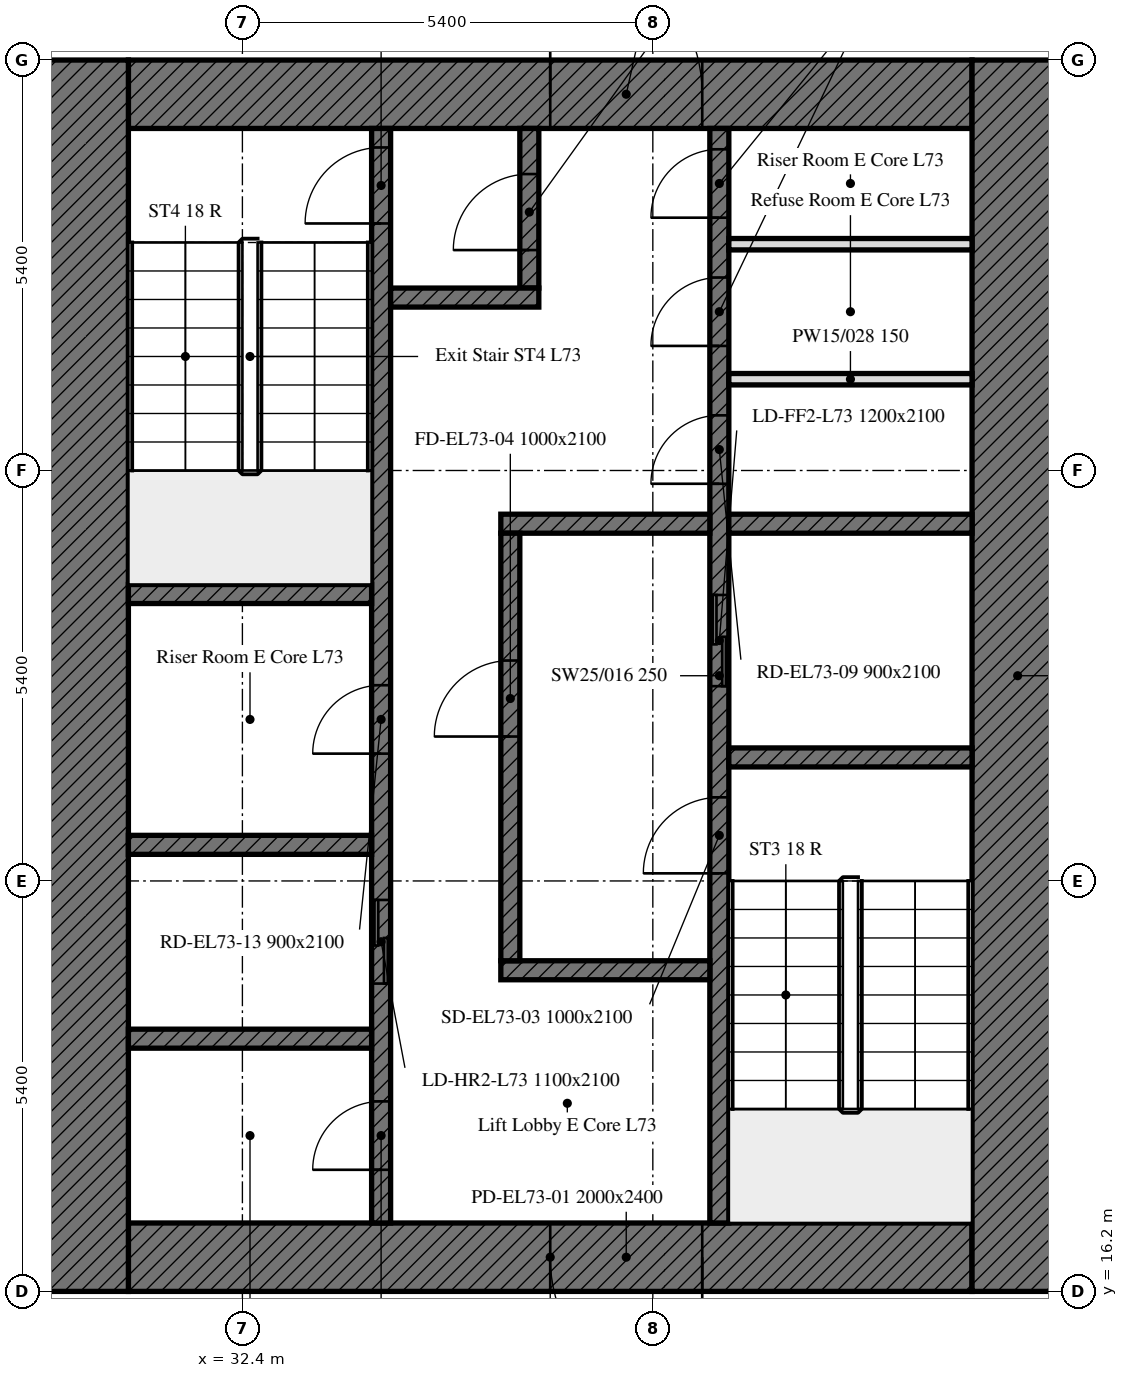
"""IFC4 building model, lengths in metres.
Left out: names, types, materials, properties, quantities, classifications, styles, units other than length and angle.
Written with IfcOpenShell. Run it as: python <this file> out.ifc"""

import sys

from ifc_helpers import new_model, si_unit, direction, frame, frame_2d, origin, place, context, subcontext, project, spatial, rectangle, extrude, element, fill, save


model = new_model("IFC4")
c1 = context("Model", 3, precision=1e-05, world=origin(), true_north=direction((0.0, 1.0)))
c2 = subcontext(c1, "Body", "Model", "MODEL_VIEW")
j1 = project(units=[si_unit("LENGTHUNIT", "METRE"), si_unit("PLANEANGLEUNIT", "RADIAN")], contexts=[c1])
p1 = place(None, origin())
s1 = spatial("IfcSite", under=j1, at=p1, CompositionType="ELEMENT")
p2 = place(p1, origin())
s2 = spatial("IfcBuilding", under=s1, at=p2, CompositionType="ELEMENT")
p3 = place(p2, frame((0.0, 0.0, 295.0)))
s3 = spatial("IfcBuildingStorey", under=s2, at=p3, CompositionType="ELEMENT", Elevation=295.0)
p4 = place(p3, frame((42.0, 16.65, 0.0), z_axis=(0.0, 0.0, 1.0), x_axis=(-1.0, 0.0, 0.0)))
e1 = element("IfcWall", 1, at=p4, inside=s3, PredefinedType="SOLIDWALL", context=c2, shape_type="SweptSolid", body=[
    extrude(rectangle(XDim=11.1, YDim=0.9, at=frame_2d((5.55, 0.0))), origin(), (0.0, 0.0, 1.0), 3.0),
])
p5 = place(p4, frame((3.55, 0.0, 0.0)))
e2 = element("IfcOpeningElement", 2, at=p5, cuts=e1, PredefinedType="OPENING", context=c2, shape_type="SweptSolid", body=[
    extrude(rectangle(XDim=2.0, YDim=2.4, at=frame_2d((1.0, 1.2))), frame((0.0, 0.45, 0.0), z_axis=(0.0, -1.0, 0.0), x_axis=(1.0, 0.0, 0.0)), (0.0, 0.0, 1.0), 0.9),
])
p6 = place(p3, frame((30.9, 31.95, 0.0), z_axis=(0.0, 0.0, 1.0), x_axis=(1.0, 0.0, 0.0)))
e3 = element("IfcWall", 3, at=p6, inside=s3, PredefinedType="SOLIDWALL", context=c2, shape_type="SweptSolid", body=[
    extrude(rectangle(XDim=11.1, YDim=0.9, at=frame_2d((5.55, 0.0))), origin(), (0.0, 0.0, 1.0), 3.0),
])
p7 = place(p6, frame((5.55, 0.0, 0.0)))
e4 = element("IfcOpeningElement", 4, at=p7, cuts=e3, PredefinedType="OPENING", context=c2, shape_type="SweptSolid", body=[
    extrude(rectangle(XDim=2.0, YDim=2.4, at=frame_2d((1.0, 1.2))), frame((0.0, 0.45, 0.0), z_axis=(0.0, -1.0, 0.0), x_axis=(1.0, 0.0, 0.0)), (0.0, 0.0, 1.0), 0.9),
])
for number, where, z_axis, x_axis in (
    (5, (42.6, 32.4, 0.0), (0.0, 0.0, 1.0), (0.0, -1.0, 0.0)),
    (6, (30.3, 16.2, 0.0), (0.0, 0.0, 1.0), (0.0, 1.0, 0.0)),
):
    element("IfcWall", number, at=place(p3, frame(where, z_axis=z_axis, x_axis=x_axis)), inside=s3, PredefinedType="SOLIDWALL", context=c2, shape_type="SweptSolid", body=[
        extrude(rectangle(XDim=16.2, YDim=1.2, at=frame_2d((8.1, 0.0))), origin(), (0.0, 0.0, 1.0), 3.0),
    ])
p8 = place(p3, frame((38.675, 17.1, 0.0), z_axis=(0.0, 0.0, 1.0), x_axis=(0.0, 1.0, 0.0)))
e7 = element("IfcWall", 7, at=p8, inside=s3, PredefinedType="SOLIDWALL", context=c2, shape_type="SweptSolid", body=[
    extrude(rectangle(XDim=14.4, YDim=0.25, at=frame_2d((7.2, 0.0))), origin(), (0.0, 0.0, 1.0), 3.0),
])
p9 = place(p8, frame((4.6, 0.0, 0.0)))
e8 = element("IfcOpeningElement", 8, at=p9, cuts=e7, PredefinedType="OPENING", context=c2, shape_type="SweptSolid", body=[
    extrude(rectangle(XDim=1.0, YDim=2.1, at=frame_2d((0.5, 1.05))), frame((0.0, 0.125, 0.0), z_axis=(0.0, -1.0, 0.0), x_axis=(1.0, 0.0, 0.0)), (0.0, 0.0, 1.0), 0.25),
])
p10 = place(p8, frame((7.062, 0.0, 0.0)))
e9 = element("IfcOpeningElement", 9, at=p10, cuts=e7, PredefinedType="OPENING", context=c2, shape_type="SweptSolid", body=[
    extrude(rectangle(XDim=1.2, YDim=2.1, at=frame_2d((0.6, 1.05))), frame((0.0, 0.125, 0.0), z_axis=(0.0, -1.0, 0.0), x_axis=(1.0, 0.0, 0.0)), (0.0, 0.0, 1.0), 0.25),
])
p11 = place(p8, frame((9.726, 0.0, 0.0)))
e10 = element("IfcOpeningElement", 10, at=p11, cuts=e7, PredefinedType="OPENING", context=c2, shape_type="SweptSolid", body=[
    extrude(rectangle(XDim=0.9, YDim=2.1, at=frame_2d((0.45, 1.05))), frame((0.0, 0.125, 0.0), z_axis=(0.0, -1.0, 0.0), x_axis=(1.0, 0.0, 0.0)), (0.0, 0.0, 1.0), 0.25),
])
p12 = place(p8, frame((11.539, 0.0, 0.0)))
e11 = element("IfcOpeningElement", 11, at=p12, cuts=e7, PredefinedType="OPENING", context=c2, shape_type="SweptSolid", body=[
    extrude(rectangle(XDim=0.9, YDim=2.1, at=frame_2d((0.45, 1.05))), frame((0.0, 0.125, 0.0), z_axis=(0.0, -1.0, 0.0), x_axis=(1.0, 0.0, 0.0)), (0.0, 0.0, 1.0), 0.25),
])
p13 = place(p8, frame((13.226, 0.0, 0.0)))
e12 = element("IfcOpeningElement", 12, at=p13, cuts=e7, PredefinedType="OPENING", context=c2, shape_type="SweptSolid", body=[
    extrude(rectangle(XDim=0.9, YDim=2.1, at=frame_2d((0.45, 1.05))), frame((0.0, 0.125, 0.0), z_axis=(0.0, -1.0, 0.0), x_axis=(1.0, 0.0, 0.0)), (0.0, 0.0, 1.0), 0.25),
])
p14 = place(p3, frame((34.225, 17.1, 0.0), z_axis=(0.0, 0.0, 1.0), x_axis=(0.0, 1.0, 0.0)))
e13 = element("IfcWall", 13, at=p14, inside=s3, PredefinedType="SOLIDWALL", context=c2, shape_type="SweptSolid", body=[
    extrude(rectangle(XDim=14.4, YDim=0.25, at=frame_2d((7.2, 0.0))), origin(), (0.0, 0.0, 1.0), 3.0),
])
p15 = place(p14, frame((13.15, 0.0, 0.0)))
e14 = element("IfcOpeningElement", 14, at=p15, cuts=e13, PredefinedType="OPENING", context=c2, shape_type="SweptSolid", body=[
    extrude(rectangle(XDim=1.0, YDim=2.1, at=frame_2d((0.5, 1.05))), frame((0.0, 0.125, 0.0), z_axis=(0.0, -1.0, 0.0), x_axis=(1.0, 0.0, 0.0)), (0.0, 0.0, 1.0), 0.25),
])
p16 = place(p14, frame((3.15, 0.0, 0.0)))
e15 = element("IfcOpeningElement", 15, at=p16, cuts=e13, PredefinedType="OPENING", context=c2, shape_type="SweptSolid", body=[
    extrude(rectangle(XDim=1.1, YDim=2.1, at=frame_2d((0.55, 1.05))), frame((0.0, 0.125, 0.0), z_axis=(0.0, -1.0, 0.0), x_axis=(1.0, 0.0, 0.0)), (0.0, 0.0, 1.0), 0.25),
])
p17 = place(p14, frame((0.7, 0.0, 0.0)))
e16 = element("IfcOpeningElement", 16, at=p17, cuts=e13, PredefinedType="OPENING", context=c2, shape_type="SweptSolid", body=[
    extrude(rectangle(XDim=0.9, YDim=2.1, at=frame_2d((0.45, 1.05))), frame((0.0, 0.125, 0.0), z_axis=(0.0, -1.0, 0.0), x_axis=(1.0, 0.0, 0.0)), (0.0, 0.0, 1.0), 0.25),
])
p18 = place(p14, frame((6.175, 0.0, 0.0)))
e17 = element("IfcOpeningElement", 17, at=p18, cuts=e13, PredefinedType="OPENING", context=c2, shape_type="SweptSolid", body=[
    extrude(rectangle(XDim=0.9, YDim=2.1, at=frame_2d((0.45, 1.05))), frame((0.0, 0.125, 0.0), z_axis=(0.0, -1.0, 0.0), x_axis=(1.0, 0.0, 0.0)), (0.0, 0.0, 1.0), 0.25),
])
p19 = place(p3, frame((38.8, 23.225, 0.0), z_axis=(0.0, 0.0, 1.0), x_axis=(1.0, 0.0, 0.0)))
e18 = element("IfcWall", 18, at=p19, inside=s3, PredefinedType="SOLIDWALL", context=c2, shape_type="SweptSolid", body=[
    extrude(rectangle(XDim=3.2, YDim=0.25, at=frame_2d((1.6, 0.0))), origin(), (0.0, 0.0, 1.0), 3.0),
])
for number, where, z_axis, x_axis in (
    (19, (30.9, 25.375, 0.0), (0.0, 0.0, 1.0), (1.0, 0.0, 0.0)),
    (20, (30.9, 22.075, 0.0), (0.0, 0.0, 1.0), (1.0, 0.0, 0.0)),
):
    element("IfcWall", number, at=place(p3, frame(where, z_axis=z_axis, x_axis=x_axis)), inside=s3, PredefinedType="SOLIDWALL", context=c2, shape_type="SweptSolid", body=[
        extrude(rectangle(XDim=3.2, YDim=0.25, at=frame_2d((1.6, 0.0))), origin(), (0.0, 0.0, 1.0), 3.0),
    ])
p20 = place(p3, frame((38.8, 26.3, 0.0), z_axis=(0.0, 0.0, 1.0), x_axis=(1.0, 0.0, 0.0)))
e21 = element("IfcWall", 21, at=p20, inside=s3, PredefinedType="SOLIDWALL", context=c2, shape_type="SweptSolid", body=[
    extrude(rectangle(XDim=3.2, YDim=0.25, at=frame_2d((1.6, 0.0))), origin(), (0.0, 0.0, 1.0), 3.0),
])
for number, where, z_axis, x_axis in (
    (22, (35.8, 26.3, 0.0), (0.0, 0.0, 1.0), (1.0, 0.0, 0.0)),
    (23, (35.8, 20.425, 0.0), (0.0, 0.0, 1.0), (1.0, 0.0, 0.0)),
):
    element("IfcWall", number, at=place(p3, frame(where, z_axis=z_axis, x_axis=x_axis)), inside=s3, PredefinedType="SOLIDWALL", context=c2, shape_type="SweptSolid", body=[
        extrude(rectangle(XDim=2.75, YDim=0.25, at=frame_2d((1.375, 0.0))), origin(), (0.0, 0.0, 1.0), 3.0),
    ])
p21 = place(p3, frame((36.175, 29.4, 0.0), z_axis=(0.0, 0.0, 1.0), x_axis=(0.0, 1.0, 0.0)))
e24 = element("IfcWall", 24, at=p21, inside=s3, PredefinedType="SOLIDWALL", context=c2, shape_type="SweptSolid", body=[
    extrude(rectangle(XDim=2.1, YDim=0.25, at=frame_2d((1.05, 0.0))), origin(), (0.0, 0.0, 1.0), 3.0),
])
p22 = place(p21, frame((0.5, 0.0, 0.0)))
e25 = element("IfcOpeningElement", 25, at=p22, cuts=e24, PredefinedType="OPENING", context=c2, shape_type="SweptSolid", body=[
    extrude(rectangle(XDim=1.0, YDim=2.1, at=frame_2d((0.5, 1.05))), frame((0.0, 0.125, 0.0), z_axis=(0.0, -1.0, 0.0), x_axis=(1.0, 0.0, 0.0)), (0.0, 0.0, 1.0), 0.25),
])
p23 = place(p3, frame((34.35, 29.275, 0.0), z_axis=(0.0, 0.0, 1.0), x_axis=(1.0, 0.0, 0.0)))
e26 = element("IfcWall", 26, at=p23, inside=s3, PredefinedType="SOLIDWALL", context=c2, shape_type="SweptSolid", body=[
    extrude(rectangle(XDim=1.95, YDim=0.25, at=frame_2d((0.975, 0.0))), origin(), (0.0, 0.0, 1.0), 3.0),
])
p24 = place(p3, frame((35.925, 20.55, 0.0), z_axis=(0.0, 0.0, 1.0), x_axis=(0.0, 1.0, 0.0)))
e27 = element("IfcWall", 27, at=p24, inside=s3, PredefinedType="SOLIDWALL", context=c2, shape_type="SweptSolid", body=[
    extrude(rectangle(XDim=5.625, YDim=0.25, at=frame_2d((2.812, 0.0))), origin(), (0.0, 0.0, 1.0), 3.0),
])
p25 = place(p24, frame((2.95, 0.0, 0.0)))
e28 = element("IfcOpeningElement", 28, at=p25, cuts=e27, PredefinedType="OPENING", context=c2, shape_type="SweptSolid", body=[
    extrude(rectangle(XDim=1.0, YDim=2.1, at=frame_2d((0.5, 1.05))), frame((0.0, 0.125, 0.0), z_axis=(0.0, -1.0, 0.0), x_axis=(1.0, 0.0, 0.0)), (0.0, 0.0, 1.0), 0.25),
])
p26 = place(p3, frame((30.9, 19.525, 0.0), z_axis=(0.0, 0.0, 1.0), x_axis=(1.0, 0.0, 0.0)))
e29 = element("IfcWall", 29, at=p26, inside=s3, PredefinedType="SOLIDWALL", context=c2, shape_type="SweptSolid", body=[
    extrude(rectangle(XDim=3.2, YDim=0.25, at=frame_2d((1.6, 0.0))), origin(), (0.0, 0.0, 1.0), 3.0),
])
for number, where, z_axis, x_axis in (
    (30, (38.8, 28.201, 0.0), (0.0, 0.0, 1.0), (1.0, 0.0, 0.0)),
    (31, (38.8, 29.977, 0.0), (0.0, 0.0, 1.0), (1.0, 0.0, 0.0)),
):
    element("IfcWall", number, at=place(p3, frame(where, z_axis=z_axis, x_axis=x_axis)), inside=s3, PredefinedType="PARTITIONING", context=c2, shape_type="SweptSolid", body=[
        extrude(rectangle(XDim=3.2, YDim=0.15, at=frame_2d((1.6, 0.0))), origin(), (0.0, 0.0, 1.0), 3.0),
    ])
p27 = place(p5, origin())
e32 = element("IfcDoor", 32, at=p27, inside=s3, OperationType="DOUBLE_DOOR_SINGLE_SWING", PredefinedType="DOOR", context=c2, shape_type="SweptSolid", body=[
    extrude(rectangle(XDim=2.0, YDim=2.4, at=frame_2d((1.0, 1.2))), frame((0.0, 0.025, 0.0), z_axis=(0.0, -1.0, 0.0), x_axis=(1.0, 0.0, 0.0)), (0.0, 0.0, 1.0), 0.05),
])
fill(e2, e32)
p28 = place(p7, origin())
e33 = element("IfcDoor", 33, at=p28, inside=s3, OperationType="DOUBLE_DOOR_SINGLE_SWING", PredefinedType="DOOR", context=c2, shape_type="SweptSolid", body=[
    extrude(rectangle(XDim=2.0, YDim=2.4, at=frame_2d((1.0, 1.2))), frame((0.0, 0.025, 0.0), z_axis=(0.0, -1.0, 0.0), x_axis=(1.0, 0.0, 0.0)), (0.0, 0.0, 1.0), 0.05),
])
fill(e4, e33)
p29 = place(p9, origin())
e34 = element("IfcDoor", 34, at=p29, inside=s3, OperationType="SINGLE_SWING_LEFT", PredefinedType="DOOR", context=c2, shape_type="SweptSolid", body=[
    extrude(rectangle(XDim=1.0, YDim=2.1, at=frame_2d((0.5, 1.05))), frame((0.0, 0.025, 0.0), z_axis=(0.0, -1.0, 0.0), x_axis=(1.0, 0.0, 0.0)), (0.0, 0.0, 1.0), 0.05),
])
fill(e8, e34)
p30 = place(p25, origin())
e35 = element("IfcDoor", 35, at=p30, inside=s3, OperationType="SINGLE_SWING_LEFT", PredefinedType="DOOR", context=c2, shape_type="SweptSolid", body=[
    extrude(rectangle(XDim=1.0, YDim=2.1, at=frame_2d((0.5, 1.05))), frame((0.0, 0.025, 0.0), z_axis=(0.0, -1.0, 0.0), x_axis=(1.0, 0.0, 0.0)), (0.0, 0.0, 1.0), 0.05),
])
fill(e28, e35)
p31 = place(p15, origin())
e36 = element("IfcDoor", 36, at=p31, inside=s3, OperationType="SINGLE_SWING_LEFT", PredefinedType="DOOR", context=c2, shape_type="SweptSolid", body=[
    extrude(rectangle(XDim=1.0, YDim=2.1, at=frame_2d((0.5, 1.05))), frame((0.0, 0.025, 0.0), z_axis=(0.0, -1.0, 0.0), x_axis=(1.0, 0.0, 0.0)), (0.0, 0.0, 1.0), 0.05),
])
fill(e14, e36)
p32 = place(p22, origin())
e37 = element("IfcDoor", 37, at=p32, inside=s3, OperationType="SINGLE_SWING_LEFT", PredefinedType="DOOR", context=c2, shape_type="SweptSolid", body=[
    extrude(rectangle(XDim=1.0, YDim=2.1, at=frame_2d((0.5, 1.05))), frame((0.0, 0.025, 0.0), z_axis=(0.0, -1.0, 0.0), x_axis=(1.0, 0.0, 0.0)), (0.0, 0.0, 1.0), 0.05),
])
fill(e25, e37)
p33 = place(p10, origin())
e38 = element("IfcDoor", 38, at=p33, inside=s3, OperationType="DOUBLE_DOOR_SLIDING", PredefinedType="DOOR", context=c2, shape_type="SweptSolid", body=[
    extrude(rectangle(XDim=1.2, YDim=2.1, at=frame_2d((0.6, 1.05))), frame((0.0, 0.025, 0.0), z_axis=(0.0, -1.0, 0.0), x_axis=(1.0, 0.0, 0.0)), (0.0, 0.0, 1.0), 0.05),
])
fill(e9, e38)
p34 = place(p16, origin())
e39 = element("IfcDoor", 39, at=p34, inside=s3, OperationType="DOUBLE_DOOR_SLIDING", PredefinedType="DOOR", context=c2, shape_type="SweptSolid", body=[
    extrude(rectangle(XDim=1.1, YDim=2.1, at=frame_2d((0.55, 1.05))), frame((0.0, 0.025, 0.0), z_axis=(0.0, -1.0, 0.0), x_axis=(1.0, 0.0, 0.0)), (0.0, 0.0, 1.0), 0.05),
])
fill(e15, e39)
p35 = place(p11, origin())
e40 = element("IfcDoor", 40, at=p35, inside=s3, OperationType="SINGLE_SWING_LEFT", PredefinedType="DOOR", context=c2, shape_type="SweptSolid", body=[
    extrude(rectangle(XDim=0.9, YDim=2.1, at=frame_2d((0.45, 1.05))), frame((0.0, 0.025, 0.0), z_axis=(0.0, -1.0, 0.0), x_axis=(1.0, 0.0, 0.0)), (0.0, 0.0, 1.0), 0.05),
])
fill(e10, e40)
p36 = place(p12, origin())
e41 = element("IfcDoor", 41, at=p36, inside=s3, OperationType="SINGLE_SWING_LEFT", PredefinedType="DOOR", context=c2, shape_type="SweptSolid", body=[
    extrude(rectangle(XDim=0.9, YDim=2.1, at=frame_2d((0.45, 1.05))), frame((0.0, 0.025, 0.0), z_axis=(0.0, -1.0, 0.0), x_axis=(1.0, 0.0, 0.0)), (0.0, 0.0, 1.0), 0.05),
])
fill(e11, e41)
p37 = place(p13, origin())
e42 = element("IfcDoor", 42, at=p37, inside=s3, OperationType="SINGLE_SWING_LEFT", PredefinedType="DOOR", context=c2, shape_type="SweptSolid", body=[
    extrude(rectangle(XDim=0.9, YDim=2.1, at=frame_2d((0.45, 1.05))), frame((0.0, 0.025, 0.0), z_axis=(0.0, -1.0, 0.0), x_axis=(1.0, 0.0, 0.0)), (0.0, 0.0, 1.0), 0.05),
])
fill(e12, e42)
p38 = place(p17, origin())
e43 = element("IfcDoor", 43, at=p38, inside=s3, OperationType="SINGLE_SWING_LEFT", PredefinedType="DOOR", context=c2, shape_type="SweptSolid", body=[
    extrude(rectangle(XDim=0.9, YDim=2.1, at=frame_2d((0.45, 1.05))), frame((0.0, 0.025, 0.0), z_axis=(0.0, -1.0, 0.0), x_axis=(1.0, 0.0, 0.0)), (0.0, 0.0, 1.0), 0.05),
])
fill(e16, e43)
p39 = place(p18, origin())
e44 = element("IfcDoor", 44, at=p39, inside=s3, OperationType="SINGLE_SWING_LEFT", PredefinedType="DOOR", context=c2, shape_type="SweptSolid", body=[
    extrude(rectangle(XDim=0.9, YDim=2.1, at=frame_2d((0.45, 1.05))), frame((0.0, 0.025, 0.0), z_axis=(0.0, -1.0, 0.0), x_axis=(1.0, 0.0, 0.0)), (0.0, 0.0, 1.0), 0.05),
])
fill(e17, e44)
save(model, sys.argv[1])
